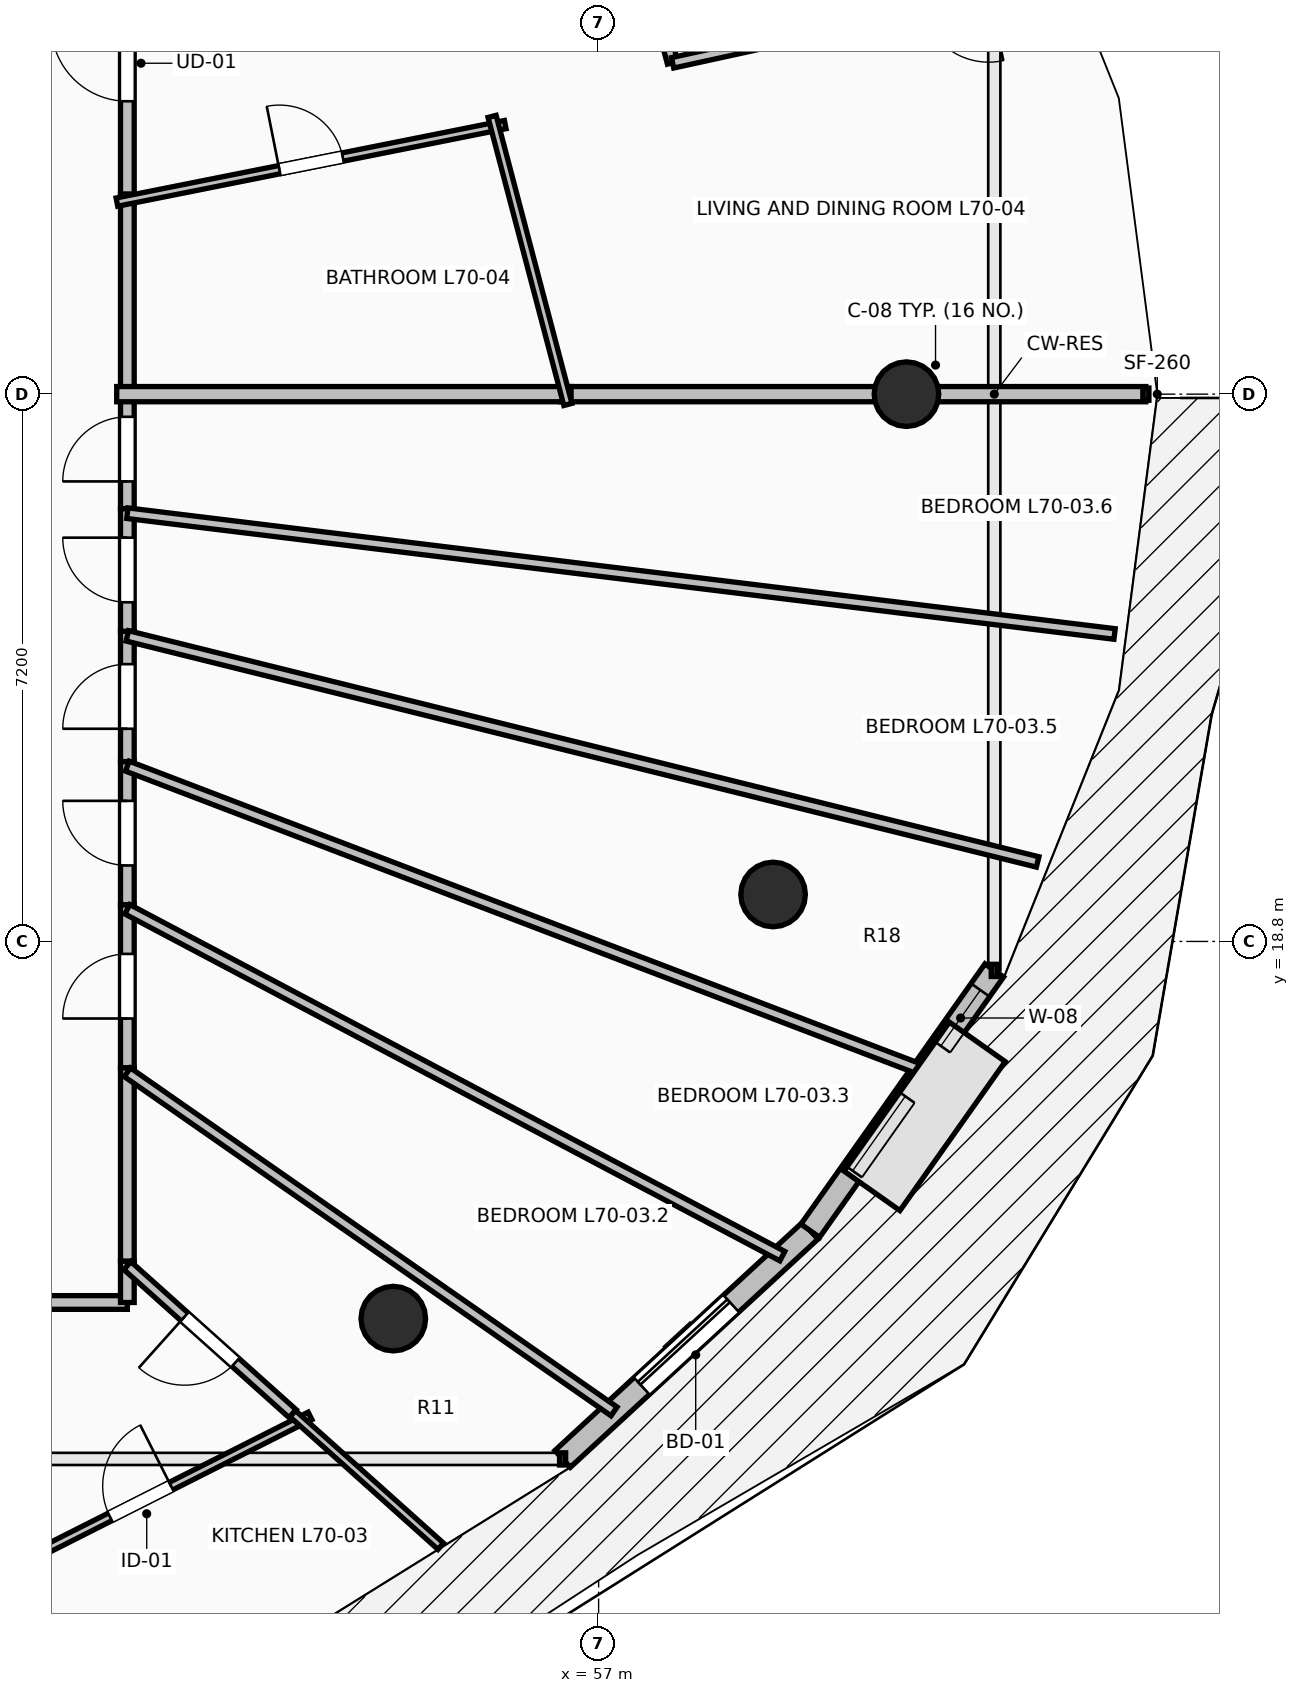
"""IFC4 building model, lengths in metres.
Left out: names, types, materials, properties, quantities, classifications, styles, units other than length and angle.
Written with IfcOpenShell. Run it as: python <this file> out.ifc"""

import sys

from ifc_helpers import new_model, si_unit, direction, frame, frame_2d, origin, origin_2d, place, context, subcontext, project, spatial, rectangle, circle, extrude, element, fill, save


model = new_model("IFC4")
c1 = context("Model", 3, precision=1e-05, world=origin(), true_north=direction((0.0, 1.0)))
c2 = subcontext(c1, "Body", "Model", "MODEL_VIEW")
j1 = project(units=[si_unit("LENGTHUNIT", "METRE"), si_unit("PLANEANGLEUNIT", "RADIAN")], contexts=[c1])
p1 = place(None, origin())
s1 = spatial("IfcSite", under=j1, at=p1, CompositionType="ELEMENT")
p2 = place(p1, origin())
s2 = spatial("IfcBuilding", under=s1, at=p2, CompositionType="ELEMENT")
p3 = place(p2, frame((0.0, 0.0, 259.1)))
s3 = spatial("IfcBuildingStorey", under=s2, at=p3, CompositionType="ELEMENT", Elevation=259.1)
for number, where, z_axis, x_axis in (
    (1, (61.05, 26.0, 0.0), (0.0, 0.0, 1.0), (1.0, 0.0, 0.0)),
    (2, (54.299, 13.838, 0.0), (0.0, 0.0, 1.0), (0.707, -0.707, 0.0)),
    (3, (59.295, 19.418, 0.0), (0.0, 0.0, 1.0), (0.924, -0.383, 0.0)),
):
    element("IfcColumn", number, at=place(p3, frame(where, z_axis=z_axis, x_axis=x_axis)), inside=s3, PredefinedType="COLUMN", context=c2, shape_type="SweptSolid", body=[
        extrude(circle(Radius=0.425, at=origin_2d()), origin(), (0.0, 0.0, 1.0), 3.55),
    ])
p4 = place(p3, frame((56.526, 11.992, 0.0), z_axis=(0.0, 0.0, 1.0), x_axis=(0.735445373611, 0.677584018727, 0.0)))
e4 = element("IfcWall", 4, at=p4, inside=s3, PredefinedType="STANDARD", context=c2, shape_type="SweptSolid", body=[
    extrude(rectangle(XDim=4.43, YDim=0.3, at=frame_2d((2.215, 0.0))), origin(), (0.0, 0.0, 1.0), 3.29),
])
p5 = place(p4, frame((1.415, 0.0, 0.0)))
e5 = element("IfcOpeningElement", 5, at=p5, cuts=e4, PredefinedType="OPENING", context=c2, shape_type="SweptSolid", body=[
    extrude(rectangle(XDim=1.6, YDim=2.3, at=frame_2d((0.8, 1.15))), frame((0.0, 0.165, 0.0), z_axis=(0.0, -1.0, 0.0), x_axis=(1.0, 0.0, 0.0)), (0.0, 0.0, 1.0), 0.33),
])
p6 = place(p3, frame((59.784, 14.994, 0.0), z_axis=(0.0, 0.0, 1.0), x_axis=(0.577261247247, 0.816559521668, 0.0)))
e6 = element("IfcWall", 6, at=p6, inside=s3, PredefinedType="STANDARD", context=c2, shape_type="SweptSolid", body=[
    extrude(rectangle(XDim=4.194, YDim=0.3, at=frame_2d((2.097, 0.0))), origin(), (0.0, 0.0, 1.0), 3.29),
])
p7 = place(p6, frame((0.966, 0.0, 0.85)))
e7 = element("IfcOpeningElement", 7, at=p7, cuts=e6, PredefinedType="OPENING", context=c2, shape_type="SweptSolid", body=[
    extrude(rectangle(XDim=1.2, YDim=1.95, at=frame_2d((0.6, 0.975))), frame((0.0, 0.165, 0.0), z_axis=(0.0, -1.0, 0.0), x_axis=(1.0, 0.0, 0.0)), (0.0, 0.0, 1.0), 0.33),
])
p8 = place(p6, frame((2.977, 0.0, 0.85)))
e8 = element("IfcOpeningElement", 8, at=p8, cuts=e6, PredefinedType="OPENING", context=c2, shape_type="SweptSolid", body=[
    extrude(rectangle(XDim=0.9, YDim=1.8, at=frame_2d((0.45, 0.9))), frame((0.0, 0.165, 0.0), z_axis=(0.0, -1.0, 0.0), x_axis=(1.0, 0.0, 0.0)), (0.0, 0.0, 1.0), 0.33),
])
p9 = place(p3, frame((45.936, 14.05, 0.0), z_axis=(0.0, 0.0, 1.0), x_axis=(1.0, 0.0, 0.0)))
e9 = element("IfcWall", 9, at=p9, inside=s3, PredefinedType="PARTITIONING", context=c2, shape_type="SweptSolid", body=[
    extrude(rectangle(XDim=4.864, YDim=0.18, at=frame_2d((2.432, 0.0))), origin(), (0.0, 0.0, 1.0), 2.482),
])
p10 = place(p9, frame((1.932, 0.0, 0.0)))
e10 = element("IfcOpeningElement", 10, at=p10, cuts=e9, PredefinedType="OPENING", context=c2, shape_type="SweptSolid", body=[
    extrude(rectangle(XDim=1.0, YDim=2.15, at=frame_2d((0.5, 1.075))), frame((0.0, 0.105, 0.0), z_axis=(0.0, -1.0, 0.0), x_axis=(1.0, 0.0, 0.0)), (0.0, 0.0, 1.0), 0.21),
])
p11 = place(p3, frame((50.8, 14.05, 0.0), z_axis=(0.0, 0.0, 1.0), x_axis=(0.0, 1.0, 0.0)))
e11 = element("IfcWall", 11, at=p11, inside=s3, PredefinedType="PARTITIONING", context=c2, shape_type="SweptSolid", body=[
    extrude(rectangle(XDim=0.545, YDim=0.18, at=frame_2d((0.272, 0.0))), origin(), (0.0, 0.0, 1.0), 3.022),
])
p12 = place(p3, frame((50.8, 14.595, 0.0), z_axis=(0.0, 0.0, 1.0), x_axis=(0.0, 1.0, 0.0)))
e12 = element("IfcWall", 12, at=p12, inside=s3, PredefinedType="PARTITIONING", context=c2, shape_type="SweptSolid", body=[
    extrude(rectangle(XDim=2.544, YDim=0.18, at=frame_2d((1.272, 0.0))), origin(), (0.0, 0.0, 1.0), 2.482),
])
p13 = place(p3, frame((50.8, 17.139, 0.0), z_axis=(0.0, 0.0, 1.0), x_axis=(0.0, 1.0, 0.0)))
e13 = element("IfcWall", 13, at=p13, inside=s3, PredefinedType="PARTITIONING", context=c2, shape_type="SweptSolid", body=[
    extrude(rectangle(XDim=2.144, YDim=0.18, at=frame_2d((1.072, 0.0))), origin(), (0.0, 0.0, 1.0), 3.29),
])
p14 = place(p13, frame((0.647, 0.0, 0.0)))
e14 = element("IfcOpeningElement", 14, at=p14, cuts=e13, PredefinedType="OPENING", context=c2, shape_type="SweptSolid", body=[
    extrude(rectangle(XDim=0.85, YDim=2.1, at=frame_2d((0.425, 1.05))), frame((0.0, 0.105, 0.0), z_axis=(0.0, -1.0, 0.0), x_axis=(1.0, 0.0, 0.0)), (0.0, 0.0, 1.0), 0.21),
])
p15 = place(p3, frame((50.8, 19.283, 0.0), z_axis=(0.0, 0.0, 1.0), x_axis=(0.0, 1.0, 0.0)))
e15 = element("IfcWall", 15, at=p15, inside=s3, PredefinedType="PARTITIONING", context=c2, shape_type="SweptSolid", body=[
    extrude(rectangle(XDim=1.883, YDim=0.18, at=frame_2d((0.941, 0.0))), origin(), (0.0, 0.0, 1.0), 3.29),
])
p16 = place(p15, frame((0.517, 0.0, 0.0)))
e16 = element("IfcOpeningElement", 16, at=p16, cuts=e15, PredefinedType="OPENING", context=c2, shape_type="SweptSolid", body=[
    extrude(rectangle(XDim=0.85, YDim=2.1, at=frame_2d((0.425, 1.05))), frame((0.0, 0.105, 0.0), z_axis=(0.0, -1.0, 0.0), x_axis=(1.0, 0.0, 0.0)), (0.0, 0.0, 1.0), 0.21),
])
p17 = place(p3, frame((50.8, 21.166, 0.0), z_axis=(0.0, 0.0, 1.0), x_axis=(0.0, 1.0, 0.0)))
e17 = element("IfcWall", 17, at=p17, inside=s3, PredefinedType="PARTITIONING", context=c2, shape_type="SweptSolid", body=[
    extrude(rectangle(XDim=1.714, YDim=0.18, at=frame_2d((0.857, 0.0))), origin(), (0.0, 0.0, 1.0), 3.29),
])
p18 = place(p17, frame((0.432, 0.0, 0.0)))
e18 = element("IfcOpeningElement", 18, at=p18, cuts=e17, PredefinedType="OPENING", context=c2, shape_type="SweptSolid", body=[
    extrude(rectangle(XDim=0.85, YDim=2.1, at=frame_2d((0.425, 1.05))), frame((0.0, 0.105, 0.0), z_axis=(0.0, -1.0, 0.0), x_axis=(1.0, 0.0, 0.0)), (0.0, 0.0, 1.0), 0.21),
])
p19 = place(p3, frame((50.8, 22.88, 0.0), z_axis=(0.0, 0.0, 1.0), x_axis=(0.0, 1.0, 0.0)))
e19 = element("IfcWall", 19, at=p19, inside=s3, PredefinedType="PARTITIONING", context=c2, shape_type="SweptSolid", body=[
    extrude(rectangle(XDim=1.614, YDim=0.18, at=frame_2d((0.807, 0.0))), origin(), (0.0, 0.0, 1.0), 3.29),
])
p20 = place(p19, frame((0.382, 0.0, 0.0)))
e20 = element("IfcOpeningElement", 20, at=p20, cuts=e19, PredefinedType="OPENING", context=c2, shape_type="SweptSolid", body=[
    extrude(rectangle(XDim=0.85, YDim=2.1, at=frame_2d((0.425, 1.05))), frame((0.0, 0.105, 0.0), z_axis=(0.0, -1.0, 0.0), x_axis=(1.0, 0.0, 0.0)), (0.0, 0.0, 1.0), 0.21),
])
p21 = place(p3, frame((50.8, 24.494, 0.0), z_axis=(0.0, 0.0, 1.0), x_axis=(0.0, 1.0, 0.0)))
e21 = element("IfcWall", 21, at=p21, inside=s3, PredefinedType="PARTITIONING", context=c2, shape_type="SweptSolid", body=[
    extrude(rectangle(XDim=1.566, YDim=0.18, at=frame_2d((0.783, 0.0))), origin(), (0.0, 0.0, 1.0), 3.29),
])
p22 = place(p21, frame((0.358, 0.0, 0.0)))
e22 = element("IfcOpeningElement", 22, at=p22, cuts=e21, PredefinedType="OPENING", context=c2, shape_type="SweptSolid", body=[
    extrude(rectangle(XDim=0.85, YDim=2.1, at=frame_2d((0.425, 1.05))), frame((0.0, 0.105, 0.0), z_axis=(0.0, -1.0, 0.0), x_axis=(1.0, 0.0, 0.0)), (0.0, 0.0, 1.0), 0.21),
])
p23 = place(p3, frame((50.8, 28.494, 0.0), z_axis=(0.0, 0.0, 1.0), x_axis=(0.0, 1.0, 0.0)))
e23 = element("IfcWall", 23, at=p23, inside=s3, PredefinedType="PARTITIONING", context=c2, shape_type="SweptSolid", body=[
    extrude(rectangle(XDim=3.719, YDim=0.18, at=frame_2d((1.859, 0.0))), origin(), (0.0, 0.0, 1.0), 3.29),
])
p24 = place(p23, frame((1.36, 0.0, 0.0)))
e24 = element("IfcOpeningElement", 24, at=p24, cuts=e23, PredefinedType="OPENING", context=c2, shape_type="SweptSolid", body=[
    extrude(rectangle(XDim=1.0, YDim=2.15, at=frame_2d((0.5, 1.075))), frame((0.0, 0.105, 0.0), z_axis=(0.0, -1.0, 0.0), x_axis=(1.0, 0.0, 0.0)), (0.0, 0.0, 1.0), 0.21),
])
p25 = place(p3, frame((50.8, 25.92, 0.0), z_axis=(0.0, 0.0, 1.0), x_axis=(0.0, 1.0, 0.0)))
e25 = element("IfcWall", 25, at=p25, inside=s3, PredefinedType="PARTITIONING", context=c2, shape_type="SweptSolid", body=[
    extrude(rectangle(XDim=2.714, YDim=0.18, at=frame_2d((1.357, 0.0))), origin(), (0.0, 0.0, 1.0), 2.482),
])
p26 = place(p3, frame((48.744, 10.305, 0.0), z_axis=(0.0, 0.0, 1.0), x_axis=(0.892523078089, 0.45100172403, 0.0)))
e26 = element("IfcWall", 26, at=p26, inside=s3, PredefinedType="PARTITIONING", context=c2, shape_type="SweptSolid", body=[
    extrude(rectangle(XDim=4.996, YDim=0.11, at=frame_2d((2.498, 0.0))), origin(), (0.0, 0.0, 1.0), 3.29),
])
p27 = place(p26, frame((2.048, 0.0, 0.0)))
e27 = element("IfcOpeningElement", 27, at=p27, cuts=e26, PredefinedType="OPENING", context=c2, shape_type="SweptSolid", body=[
    extrude(rectangle(XDim=0.9, YDim=2.1, at=frame_2d((0.45, 1.05))), frame((0.0, 0.07, 0.0), z_axis=(0.0, -1.0, 0.0), x_axis=(1.0, 0.0, 0.0)), (0.0, 0.0, 1.0), 0.14),
])
p28 = place(p3, frame((52.974, 12.588, 0.0), z_axis=(0.0, 0.0, 1.0), x_axis=(0.744980199756, -0.667086577568, 0.0)))
e28 = element("IfcWall", 28, at=p28, inside=s3, PredefinedType="PARTITIONING", context=c2, shape_type="SweptSolid", body=[
    extrude(rectangle(XDim=2.617, YDim=0.11, at=frame_2d((1.309, 0.0))), origin(), (0.0, 0.0, 1.0), 3.29),
])
p29 = place(p3, frame((50.213, 8.436, 0.0), z_axis=(0.0, 0.0, 1.0), x_axis=(-0.571041537148, 0.820921167258, 0.0)))
e29 = element("IfcWall", 29, at=p29, inside=s3, PredefinedType="PARTITIONING", context=c2, shape_type="SweptSolid", body=[
    extrude(rectangle(XDim=2.493, YDim=0.11, at=frame_2d((1.247, 0.0))), origin(), (0.0, 0.0, 1.0), 3.29),
])
p30 = place(p3, frame((52.974, 12.588, 0.0), z_axis=(0.0, 0.0, 1.0), x_axis=(-0.744943619707, 0.667127426702, 0.0)))
e30 = element("IfcWall", 30, at=p30, inside=s3, PredefinedType="PARTITIONING", context=c2, shape_type="SweptSolid", body=[
    extrude(rectangle(XDim=2.918, YDim=0.14, at=frame_2d((1.459, 0.0))), origin(), (0.0, 0.0, 1.0), 2.874),
])
p31 = place(p30, frame((1.009, 0.0, 0.0)))
e31 = element("IfcOpeningElement", 31, at=p31, cuts=e30, PredefinedType="OPENING", context=c2, shape_type="SweptSolid", body=[
    extrude(rectangle(XDim=0.9, YDim=2.1, at=frame_2d((0.45, 1.05))), frame((0.0, 0.085, 0.0), z_axis=(0.0, -1.0, 0.0), x_axis=(1.0, 0.0, 0.0)), (0.0, 0.0, 1.0), 0.17),
])
p32 = place(p3, frame((57.203, 12.617, 0.0), z_axis=(0.0, 0.0, 1.0), x_axis=(-0.820423513177, 0.571756293386, 0.0)))
e32 = element("IfcWall", 32, at=p32, inside=s3, PredefinedType="PARTITIONING", context=c2, shape_type="SweptSolid", body=[
    extrude(rectangle(XDim=7.804, YDim=0.14, at=frame_2d((3.902, 0.0))), origin(), (0.0, 0.0, 1.0), 2.874),
])
p33 = place(p3, frame((59.417, 14.66, 0.0), z_axis=(0.0, 0.0, 1.0), x_axis=(-0.883742233358, 0.467974000325, 0.0)))
e33 = element("IfcWall", 33, at=p33, inside=s3, PredefinedType="PARTITIONING", context=c2, shape_type="SweptSolid", body=[
    extrude(rectangle(XDim=9.75, YDim=0.14, at=frame_2d((4.875, 0.0))), origin(), (0.0, 0.0, 1.0), 2.874),
])
p34 = place(p3, frame((61.271, 17.102, 0.0), z_axis=(0.0, 0.0, 1.0), x_axis=(-0.934042646632, 0.357161496066, 0.0)))
e34 = element("IfcWall", 34, at=p34, inside=s3, PredefinedType="PARTITIONING", context=c2, shape_type="SweptSolid", body=[
    extrude(rectangle(XDim=11.21, YDim=0.14, at=frame_2d((5.605, 0.0))), origin(), (0.0, 0.0, 1.0), 2.874),
])
p35 = place(p3, frame((62.776, 19.846, 0.0), z_axis=(0.0, 0.0, 1.0), x_axis=(-0.970519565335, 0.241022350211, 0.0)))
e35 = element("IfcWall", 35, at=p35, inside=s3, PredefinedType="PARTITIONING", context=c2, shape_type="SweptSolid", body=[
    extrude(rectangle(XDim=12.34, YDim=0.14, at=frame_2d((6.17, 0.0))), origin(), (0.0, 0.0, 1.0), 2.482),
])
p36 = place(p3, frame((63.788, 22.845, 0.0), z_axis=(0.0, 0.0, 1.0), x_axis=(-0.992598006299, 0.121446275738, 0.0)))
e36 = element("IfcWall", 36, at=p36, inside=s3, PredefinedType="PARTITIONING", context=c2, shape_type="SweptSolid", body=[
    extrude(rectangle(XDim=13.085, YDim=0.14, at=frame_2d((6.542, 0.0))), origin(), (0.0, 0.0, 1.0), 2.482),
])
p37 = place(p3, frame((64.199, 26.0, 0.0), z_axis=(0.0, 0.0, 1.0), x_axis=(-1.0, 0.0, 0.0)))
e37 = element("IfcWall", 37, at=p37, inside=s3, PredefinedType="PARTITIONING", context=c2, shape_type="SweptSolid", body=[
    extrude(rectangle(XDim=7.701, YDim=0.2, at=frame_2d((3.851, 0.0))), origin(), (0.0, 0.0, 1.0), 2.482),
])
p38 = place(p3, frame((56.638, 26.0, 0.0), z_axis=(0.0, 0.0, 1.0), x_axis=(-1.0, 0.0, 0.0)))
e38 = element("IfcWall", 38, at=p38, inside=s3, PredefinedType="PARTITIONING", context=c2, shape_type="SweptSolid", body=[
    extrude(rectangle(XDim=5.978, YDim=0.2, at=frame_2d((2.989, 0.0))), origin(), (0.0, 0.0, 1.0), 2.482),
])
p39 = place(p3, frame((50.663, 28.527, 0.0), z_axis=(0.0, 0.0, 1.0), x_axis=(0.980652709614, 0.195755620935, 0.0)))
e39 = element("IfcWall", 39, at=p39, inside=s3, PredefinedType="PARTITIONING", context=c2, shape_type="SweptSolid", body=[
    extrude(rectangle(XDim=5.209, YDim=0.11, at=frame_2d((2.605, 0.0))), origin(), (0.0, 0.0, 1.0), 2.936),
])
p40 = place(p39, frame((2.18, 0.0, 0.0)))
e40 = element("IfcOpeningElement", 40, at=p40, cuts=e39, PredefinedType="OPENING", context=c2, shape_type="SweptSolid", body=[
    extrude(rectangle(XDim=0.85, YDim=2.1, at=frame_2d((0.425, 1.05))), frame((0.0, 0.07, 0.0), z_axis=(0.0, -1.0, 0.0), x_axis=(1.0, 0.0, 0.0)), (0.0, 0.0, 1.0), 0.14),
])
p41 = place(p3, frame((55.598, 29.654, 0.0), z_axis=(0.0, 0.0, 1.0), x_axis=(0.25449329928, -0.967074537263, 0.0)))
e41 = element("IfcWall", 41, at=p41, inside=s3, PredefinedType="PARTITIONING", context=c2, shape_type="SweptSolid", body=[
    extrude(rectangle(XDim=3.919, YDim=0.11, at=frame_2d((1.959, 0.0))), origin(), (0.0, 0.0, 1.0), 2.482),
])
p42 = place(p3, frame((57.973, 30.359, 0.0), z_axis=(0.0, 0.0, 1.0), x_axis=(-0.254274526126, 0.967132082687, 0.0)))
e42 = element("IfcWall", 42, at=p42, inside=s3, PredefinedType="PARTITIONING", context=c2, shape_type="SweptSolid", body=[
    extrude(rectangle(XDim=1.813, YDim=0.14, at=frame_2d((0.906, 0.0))), origin(), (0.0, 0.0, 1.0), 3.29),
])
p43 = place(p3, frame((60.198, 30.845, 0.0), z_axis=(0.0, 0.0, 1.0), x_axis=(-0.976965000645, -0.213399595862, 0.0)))
e43 = element("IfcWall", 43, at=p43, inside=s3, PredefinedType="PARTITIONING", context=c2, shape_type="SweptSolid", body=[
    extrude(rectangle(XDim=2.278, YDim=0.14, at=frame_2d((1.139, 0.0))), origin(), (0.0, 0.0, 1.0), 2.874),
])
p44 = place(p5, origin())
e44 = element("IfcDoor", 44, at=p44, inside=s3, OperationType="SLIDING_TO_LEFT", PredefinedType="DOOR", context=c2, shape_type="SweptSolid", body=[
    extrude(rectangle(XDim=1.6, YDim=2.3, at=frame_2d((0.8, 1.15))), frame((0.0, 0.025, 0.0), z_axis=(0.0, -1.0, 0.0), x_axis=(1.0, 0.0, 0.0)), (0.0, 0.0, 1.0), 0.05),
])
fill(e5, e44)
p45 = place(p7, origin())
e45 = element("IfcWindow", 45, at=p45, inside=s3, PartitioningType="SINGLE_PANEL", PredefinedType="WINDOW", context=c2, shape_type="SweptSolid", body=[
    extrude(rectangle(XDim=1.2, YDim=1.95, at=frame_2d((0.6, 0.975))), frame((0.0, 0.03, 0.0), z_axis=(0.0, -1.0, 0.0), x_axis=(1.0, 0.0, 0.0)), (0.0, 0.0, 1.0), 0.06),
])
fill(e7, e45)
p46 = place(p8, origin())
e46 = element("IfcWindow", 46, at=p46, inside=s3, PartitioningType="SINGLE_PANEL", PredefinedType="WINDOW", context=c2, shape_type="SweptSolid", body=[
    extrude(rectangle(XDim=0.9, YDim=1.8, at=frame_2d((0.45, 0.9))), frame((0.0, 0.03, 0.0), z_axis=(0.0, -1.0, 0.0), x_axis=(1.0, 0.0, 0.0)), (0.0, 0.0, 1.0), 0.06),
])
fill(e8, e46)
p47 = place(p24, origin())
e47 = element("IfcDoor", 47, at=p47, inside=s3, OperationType="SINGLE_SWING_RIGHT", PredefinedType="DOOR", context=c2, shape_type="SweptSolid", body=[
    extrude(rectangle(XDim=1.0, YDim=2.15, at=frame_2d((0.5, 1.075))), frame((0.0, 0.025, 0.0), z_axis=(0.0, -1.0, 0.0), x_axis=(1.0, 0.0, 0.0)), (0.0, 0.0, 1.0), 0.05),
])
fill(e24, e47)
p48 = place(p27, origin())
e48 = element("IfcDoor", 48, at=p48, inside=s3, OperationType="SINGLE_SWING_RIGHT", PredefinedType="DOOR", context=c2, shape_type="SweptSolid", body=[
    extrude(rectangle(XDim=0.9, YDim=2.1, at=frame_2d((0.45, 1.05))), frame((0.0, 0.025, 0.0), z_axis=(0.0, -1.0, 0.0), x_axis=(1.0, 0.0, 0.0)), (0.0, 0.0, 1.0), 0.05),
])
fill(e27, e48)
p49 = place(p31, origin())
e49 = element("IfcDoor", 49, at=p49, inside=s3, OperationType="SINGLE_SWING_RIGHT", PredefinedType="DOOR", context=c2, shape_type="SweptSolid", body=[
    extrude(rectangle(XDim=0.9, YDim=2.1, at=frame_2d((0.45, 1.05))), frame((0.0, 0.025, 0.0), z_axis=(0.0, -1.0, 0.0), x_axis=(1.0, 0.0, 0.0)), (0.0, 0.0, 1.0), 0.05),
])
fill(e31, e49)
p50 = place(p40, origin())
e50 = element("IfcDoor", 50, at=p50, inside=s3, OperationType="SINGLE_SWING_LEFT", PredefinedType="DOOR", context=c2, shape_type="SweptSolid", body=[
    extrude(rectangle(XDim=0.85, YDim=2.1, at=frame_2d((0.425, 1.05))), frame((0.0, 0.025, 0.0), z_axis=(0.0, -1.0, 0.0), x_axis=(1.0, 0.0, 0.0)), (0.0, 0.0, 1.0), 0.05),
])
fill(e40, e50)
p51 = place(p14, origin())
e51 = element("IfcDoor", 51, at=p51, inside=s3, OperationType="SINGLE_SWING_LEFT", PredefinedType="DOOR", context=c2, shape_type="SweptSolid", body=[
    extrude(rectangle(XDim=0.85, YDim=2.1, at=frame_2d((0.425, 1.05))), frame((0.0, 0.025, 0.0), z_axis=(0.0, -1.0, 0.0), x_axis=(1.0, 0.0, 0.0)), (0.0, 0.0, 1.0), 0.05),
])
fill(e14, e51)
p52 = place(p16, origin())
e52 = element("IfcDoor", 52, at=p52, inside=s3, OperationType="SINGLE_SWING_RIGHT", PredefinedType="DOOR", context=c2, shape_type="SweptSolid", body=[
    extrude(rectangle(XDim=0.85, YDim=2.1, at=frame_2d((0.425, 1.05))), frame((0.0, 0.025, 0.0), z_axis=(0.0, -1.0, 0.0), x_axis=(1.0, 0.0, 0.0)), (0.0, 0.0, 1.0), 0.05),
])
fill(e16, e52)
p53 = place(p18, origin())
e53 = element("IfcDoor", 53, at=p53, inside=s3, OperationType="SINGLE_SWING_LEFT", PredefinedType="DOOR", context=c2, shape_type="SweptSolid", body=[
    extrude(rectangle(XDim=0.85, YDim=2.1, at=frame_2d((0.425, 1.05))), frame((0.0, 0.025, 0.0), z_axis=(0.0, -1.0, 0.0), x_axis=(1.0, 0.0, 0.0)), (0.0, 0.0, 1.0), 0.05),
])
fill(e18, e53)
p54 = place(p20, origin())
e54 = element("IfcDoor", 54, at=p54, inside=s3, OperationType="SINGLE_SWING_RIGHT", PredefinedType="DOOR", context=c2, shape_type="SweptSolid", body=[
    extrude(rectangle(XDim=0.85, YDim=2.1, at=frame_2d((0.425, 1.05))), frame((0.0, 0.025, 0.0), z_axis=(0.0, -1.0, 0.0), x_axis=(1.0, 0.0, 0.0)), (0.0, 0.0, 1.0), 0.05),
])
fill(e20, e54)
p55 = place(p22, origin())
e55 = element("IfcDoor", 55, at=p55, inside=s3, OperationType="SINGLE_SWING_LEFT", PredefinedType="DOOR", context=c2, shape_type="SweptSolid", body=[
    extrude(rectangle(XDim=0.85, YDim=2.1, at=frame_2d((0.425, 1.05))), frame((0.0, 0.025, 0.0), z_axis=(0.0, -1.0, 0.0), x_axis=(1.0, 0.0, 0.0)), (0.0, 0.0, 1.0), 0.05),
])
fill(e22, e55)
save(model, sys.argv[1])
